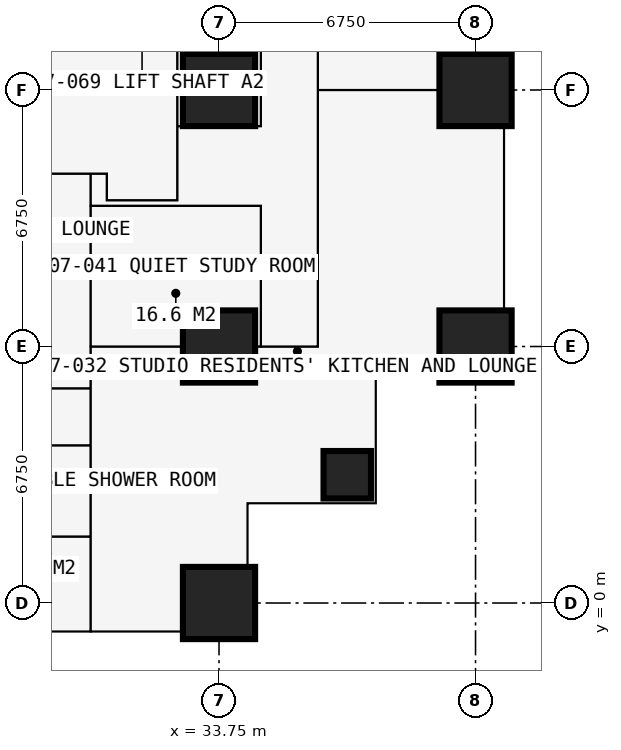
"""IFC4 building model, lengths in metres.
Left out: names, types, materials, properties, quantities, classifications, styles, units other than length and angle.
Written with IfcOpenShell. Run it as: python <this file> out.ifc"""

import sys

from ifc_helpers import new_model, si_unit, direction, frame, frame_2d, origin, origin_2d, place, context, subcontext, project, spatial, rectangle, extrude, element, fill, save


model = new_model("IFC4")
c1 = context("Model", 3, precision=1e-05, world=origin(), true_north=direction((0.0, 1.0)))
c2 = subcontext(c1, "Body", "Model", "MODEL_VIEW")
j1 = project(units=[si_unit("LENGTHUNIT", "METRE"), si_unit("PLANEANGLEUNIT", "RADIAN")], contexts=[c1])
p1 = place(None, origin())
s1 = spatial("IfcSite", under=j1, at=p1, CompositionType="ELEMENT")
p2 = place(p1, origin())
s2 = spatial("IfcBuilding", under=s1, at=p2, CompositionType="ELEMENT")
p3 = place(p2, frame((0.0, 0.0, 28.8)))
s3 = spatial("IfcBuildingStorey", under=s2, at=p3, CompositionType="ELEMENT", Elevation=28.8)
for number, where, z_axis, x_axis in (
    (1, (33.75, 0.0, 0.0), (0.0, 0.0, 1.0), (1.0, 0.0, 0.0)),
    (2, (33.75, 6.75, 0.0), (0.0, 0.0, 1.0), (1.0, 0.0, 0.0)),
    (3, (33.75, 13.5, 0.0), (0.0, 0.0, 1.0), (1.0, 0.0, 0.0)),
):
    element("IfcColumn", number, at=place(p3, frame(where, z_axis=z_axis, x_axis=x_axis)), inside=s3, PredefinedType="COLUMN", context=c2, shape_type="SweptSolid", body=[
        extrude(rectangle(XDim=1.9, YDim=1.9, at=origin_2d()), origin(), (0.0, 0.0, 1.0), 3.6),
    ])
p4 = place(p3, frame((37.125, 3.375, 0.0), z_axis=(0.0, 0.0, 1.0), x_axis=(1.0, 0.0, 0.0)))
e4 = element("IfcColumn", 4, at=p4, inside=s3, PredefinedType="COLUMN", context=c2, shape_type="SweptSolid", body=[
    extrude(rectangle(XDim=1.25, YDim=1.25, at=origin_2d()), origin(), (0.0, 0.0, 1.0), 3.6),
])
for number, where, z_axis, x_axis in (
    (5, (40.5, 6.75, 0.0), (0.0, 0.0, 1.0), (1.0, 0.0, 0.0)),
    (6, (40.5, 13.5, 0.0), (0.0, 0.0, 1.0), (1.0, 0.0, 0.0)),
):
    element("IfcColumn", number, at=place(p3, frame(where, z_axis=z_axis, x_axis=x_axis)), inside=s3, PredefinedType="COLUMN", context=c2, shape_type="SweptSolid", body=[
        extrude(rectangle(XDim=1.9, YDim=1.9, at=origin_2d()), origin(), (0.0, 0.0, 1.0), 3.6),
    ])
p5 = place(p3, frame((34.5, -0.75, 0.0), z_axis=(0.0, 0.0, 1.0), x_axis=(0.0, 1.0, 0.0)))
e7 = element("IfcWall", 7, at=p5, inside=s3, PredefinedType="SOLIDWALL", context=c2, shape_type="SweptSolid", body=[
    extrude(rectangle(XDim=3.375, YDim=0.3, at=frame_2d((1.688, 0.0))), origin(), (0.0, 0.0, 1.0), 3.375),
])
p6 = place(p5, frame((1.857, 0.0, 0.9)))
e8 = element("IfcOpeningElement", 8, at=p6, cuts=e7, PredefinedType="OPENING", context=c2, shape_type="SweptSolid", body=[
    extrude(rectangle(XDim=1.2, YDim=1.8, at=frame_2d((0.6, 0.9))), frame((0.0, 0.16, 0.0), z_axis=(0.0, -1.0, 0.0), x_axis=(1.0, 0.0, 0.0)), (0.0, 0.0, 1.0), 0.32),
])
p7 = place(p3, frame((34.5, 2.625, 0.0), z_axis=(0.0, 0.0, 1.0), x_axis=(1.0, 0.0, 0.0)))
e9 = element("IfcWall", 9, at=p7, inside=s3, PredefinedType="SOLIDWALL", context=c2, shape_type="SweptSolid", body=[
    extrude(rectangle(XDim=3.375, YDim=0.3, at=frame_2d((1.688, 0.0))), origin(), (0.0, 0.0, 1.0), 3.375),
])
p8 = place(p7, frame((0.788, 0.0, 0.6)))
e10 = element("IfcOpeningElement", 10, at=p8, cuts=e9, PredefinedType="OPENING", context=c2, shape_type="SweptSolid", body=[
    extrude(rectangle(XDim=1.8, YDim=2.1, at=frame_2d((0.9, 1.05))), frame((0.0, 0.16, 0.0), z_axis=(0.0, -1.0, 0.0), x_axis=(1.0, 0.0, 0.0)), (0.0, 0.0, 1.0), 0.32),
])
p9 = place(p3, frame((37.875, 2.625, 0.0), z_axis=(0.0, 0.0, 1.0), x_axis=(0.0, 1.0, 0.0)))
e11 = element("IfcWall", 11, at=p9, inside=s3, PredefinedType="SOLIDWALL", context=c2, shape_type="SweptSolid", body=[
    extrude(rectangle(XDim=3.375, YDim=0.3, at=frame_2d((1.688, 0.0))), origin(), (0.0, 0.0, 1.0), 3.375),
])
p10 = place(p9, frame((0.788, 0.0, 0.6)))
e12 = element("IfcOpeningElement", 12, at=p10, cuts=e11, PredefinedType="OPENING", context=c2, shape_type="SweptSolid", body=[
    extrude(rectangle(XDim=1.8, YDim=2.1, at=frame_2d((0.9, 1.05))), frame((0.0, 0.16, 0.0), z_axis=(0.0, -1.0, 0.0), x_axis=(1.0, 0.0, 0.0)), (0.0, 0.0, 1.0), 0.32),
])
p11 = place(p3, frame((37.875, 6.0, 0.0), z_axis=(0.0, 0.0, 1.0), x_axis=(1.0, 0.0, 0.0)))
e13 = element("IfcWall", 13, at=p11, inside=s3, PredefinedType="SOLIDWALL", context=c2, shape_type="SweptSolid", body=[
    extrude(rectangle(XDim=3.375, YDim=0.3, at=frame_2d((1.688, 0.0))), origin(), (0.0, 0.0, 1.0), 3.375),
])
p12 = place(p11, frame((0.317, 0.0, 0.9)))
e14 = element("IfcOpeningElement", 14, at=p12, cuts=e13, PredefinedType="OPENING", context=c2, shape_type="SweptSolid", body=[
    extrude(rectangle(XDim=1.2, YDim=1.8, at=frame_2d((0.6, 0.9))), frame((0.0, 0.16, 0.0), z_axis=(0.0, -1.0, 0.0), x_axis=(1.0, 0.0, 0.0)), (0.0, 0.0, 1.0), 0.32),
])
p13 = place(p3, frame((6.75, 4.15, 0.0), z_axis=(0.0, 0.0, 1.0), x_axis=(1.0, 0.0, 0.0)))
e15 = element("IfcWall", 15, at=p13, inside=s3, PredefinedType="PARTITIONING", context=c2, shape_type="SweptSolid", body=[
    extrude(rectangle(XDim=23.625, YDim=0.15, at=frame_2d((11.812, 0.0))), origin(), (0.0, 0.0, 1.0), 3.375),
])
p14 = place(p13, frame((0.2, 0.0, 0.0)))
e16 = element("IfcOpeningElement", 16, at=p14, cuts=e15, PredefinedType="OPENING", context=c2, shape_type="SweptSolid", body=[
    extrude(rectangle(XDim=0.95, YDim=2.2, at=frame_2d((0.475, 1.1))), frame((0.0, 0.085, 0.0), z_axis=(0.0, -1.0, 0.0), x_axis=(1.0, 0.0, 0.0)), (0.0, 0.0, 1.0), 0.17),
])
p15 = place(p13, frame((3.625, 0.0, 0.0)))
e17 = element("IfcOpeningElement", 17, at=p15, cuts=e15, PredefinedType="OPENING", context=c2, shape_type="SweptSolid", body=[
    extrude(rectangle(XDim=0.95, YDim=2.2, at=frame_2d((0.475, 1.1))), frame((0.0, 0.085, 0.0), z_axis=(0.0, -1.0, 0.0), x_axis=(1.0, 0.0, 0.0)), (0.0, 0.0, 1.0), 0.17),
])
p16 = place(p13, frame((18.475, 0.0, 0.0)))
e18 = element("IfcOpeningElement", 18, at=p16, cuts=e15, PredefinedType="OPENING", context=c2, shape_type="SweptSolid", body=[
    extrude(rectangle(XDim=0.95, YDim=2.2, at=frame_2d((0.475, 1.1))), frame((0.0, 0.085, 0.0), z_axis=(0.0, -1.0, 0.0), x_axis=(1.0, 0.0, 0.0)), (0.0, 0.0, 1.0), 0.17),
])
p17 = place(p13, frame((11.725, 0.0, 0.0)))
e19 = element("IfcOpeningElement", 19, at=p17, cuts=e15, PredefinedType="OPENING", context=c2, shape_type="SweptSolid", body=[
    extrude(rectangle(XDim=0.95, YDim=2.2, at=frame_2d((0.475, 1.1))), frame((0.0, 0.085, 0.0), z_axis=(0.0, -1.0, 0.0), x_axis=(1.0, 0.0, 0.0)), (0.0, 0.0, 1.0), 0.17),
])
p18 = place(p13, frame((6.95, 0.0, 0.0)))
e20 = element("IfcOpeningElement", 20, at=p18, cuts=e15, PredefinedType="OPENING", context=c2, shape_type="SweptSolid", body=[
    extrude(rectangle(XDim=0.95, YDim=2.2, at=frame_2d((0.475, 1.1))), frame((0.0, 0.085, 0.0), z_axis=(0.0, -1.0, 0.0), x_axis=(1.0, 0.0, 0.0)), (0.0, 0.0, 1.0), 0.17),
])
p19 = place(p3, frame((10.125, 11.3, 0.0), z_axis=(0.0, 0.0, 1.0), x_axis=(1.0, 0.0, 0.0)))
e21 = element("IfcWall", 21, at=p19, inside=s3, PredefinedType="PARTITIONING", context=c2, shape_type="SweptSolid", body=[
    extrude(rectangle(XDim=20.675, YDim=0.15, at=frame_2d((10.337, 0.0))), origin(), (0.0, 0.0, 1.0), 3.375),
])
p20 = place(p19, frame((1.775, 0.0, 0.0)))
e22 = element("IfcOpeningElement", 22, at=p20, cuts=e21, PredefinedType="OPENING", context=c2, shape_type="SweptSolid", body=[
    extrude(rectangle(XDim=1.0, YDim=2.2, at=frame_2d((0.5, 1.1))), frame((0.0, 0.085, 0.0), z_axis=(0.0, -1.0, 0.0), x_axis=(1.0, 0.0, 0.0)), (0.0, 0.0, 1.0), 0.17),
])
p21 = place(p19, frame((11.312, 0.0, 0.0)))
e23 = element("IfcOpeningElement", 23, at=p21, cuts=e21, PredefinedType="OPENING", context=c2, shape_type="SweptSolid", body=[
    extrude(rectangle(XDim=1.0, YDim=2.2, at=frame_2d((0.5, 1.1))), frame((0.0, 0.085, 0.0), z_axis=(0.0, -1.0, 0.0), x_axis=(1.0, 0.0, 0.0)), (0.0, 0.0, 1.0), 0.17),
])
p22 = place(p3, frame((22.988, 5.65, 0.0), z_axis=(0.0, 0.0, 1.0), x_axis=(1.0, 0.0, 0.0)))
e24 = element("IfcWall", 24, at=p22, inside=s3, PredefinedType="PARTITIONING", context=c2, shape_type="SweptSolid", body=[
    extrude(rectangle(XDim=7.387, YDim=0.15, at=frame_2d((3.694, 0.0))), origin(), (0.0, 0.0, 1.0), 3.375),
])
p23 = place(p22, frame((2.1, 0.0, 0.0)))
e25 = element("IfcOpeningElement", 25, at=p23, cuts=e24, PredefinedType="OPENING", context=c2, shape_type="SweptSolid", body=[
    extrude(rectangle(XDim=0.95, YDim=2.2, at=frame_2d((0.475, 1.1))), frame((0.0, 0.085, 0.0), z_axis=(0.0, -1.0, 0.0), x_axis=(1.0, 0.0, 0.0)), (0.0, 0.0, 1.0), 0.17),
])
p24 = place(p3, frame((27.775, 1.75, 0.0), z_axis=(0.0, 0.0, 1.0), x_axis=(1.0, 0.0, 0.0)))
e26 = element("IfcWall", 26, at=p24, inside=s3, PredefinedType="PARTITIONING", context=c2, shape_type="SweptSolid", body=[
    extrude(rectangle(XDim=2.6, YDim=0.1, at=frame_2d((1.3, 0.0))), origin(), (0.0, 0.0, 1.0), 3.375),
])
p25 = place(p24, frame((0.85, 0.0, 0.0)))
e27 = element("IfcOpeningElement", 27, at=p25, cuts=e26, PredefinedType="OPENING", context=c2, shape_type="SweptSolid", body=[
    extrude(rectangle(XDim=0.9, YDim=2.2, at=frame_2d((0.45, 1.1))), frame((0.0, 0.06, 0.0), z_axis=(0.0, -1.0, 0.0), x_axis=(1.0, 0.0, 0.0)), (0.0, 0.0, 1.0), 0.12),
])
p26 = place(p3, frame((30.375, -0.734, 0.0), z_axis=(0.0, 0.0, 1.0), x_axis=(0.0, 1.0, 0.0)))
e28 = element("IfcWall", 28, at=p26, inside=s3, PredefinedType="PARTITIONING", context=c2, shape_type="SweptSolid", body=[
    extrude(rectangle(XDim=12.034, YDim=0.15, at=frame_2d((6.017, 0.0))), origin(), (0.0, 0.0, 1.0), 3.375),
])
p27 = place(p26, frame((5.134, 0.0, 0.0)))
e29 = element("IfcOpeningElement", 29, at=p27, cuts=e28, PredefinedType="OPENING", context=c2, shape_type="SweptSolid", body=[
    extrude(rectangle(XDim=1.0, YDim=2.2, at=frame_2d((0.5, 1.1))), frame((0.0, 0.085, 0.0), z_axis=(0.0, -1.0, 0.0), x_axis=(1.0, 0.0, 0.0)), (0.0, 0.0, 1.0), 0.17),
])
p28 = place(p3, frame((30.375, 6.75, 0.0), z_axis=(0.0, 0.0, 1.0), x_axis=(1.0, 0.0, 0.0)))
e30 = element("IfcWall", 30, at=p28, inside=s3, PredefinedType="PARTITIONING", context=c2, shape_type="SweptSolid", body=[
    extrude(rectangle(XDim=5.975, YDim=0.15, at=frame_2d((2.988, 0.0))), origin(), (0.0, 0.0, 1.0), 2.877),
])
p29 = place(p3, frame((30.375, 10.45, 0.0), z_axis=(0.0, 0.0, 1.0), x_axis=(1.0, 0.0, 0.0)))
e31 = element("IfcWall", 31, at=p29, inside=s3, PredefinedType="PARTITIONING", context=c2, shape_type="SweptSolid", body=[
    extrude(rectangle(XDim=4.475, YDim=0.15, at=frame_2d((2.238, 0.0))), origin(), (0.0, 0.0, 1.0), 3.375),
])
p30 = place(p29, frame((2.35, 0.0, 0.0)))
e32 = element("IfcOpeningElement", 32, at=p30, cuts=e31, PredefinedType="OPENING", context=c2, shape_type="SweptSolid", body=[
    extrude(rectangle(XDim=0.95, YDim=2.2, at=frame_2d((0.475, 1.1))), frame((0.0, 0.085, 0.0), z_axis=(0.0, -1.0, 0.0), x_axis=(1.0, 0.0, 0.0)), (0.0, 0.0, 1.0), 0.17),
])
p31 = place(p3, frame((30.8, 10.6, 0.0), z_axis=(0.0, 0.0, 1.0), x_axis=(0.0, 1.0, 0.0)))
e33 = element("IfcWall", 33, at=p31, inside=s3, PredefinedType="PARTITIONING", context=c2, shape_type="SweptSolid", body=[
    extrude(rectangle(XDim=0.7, YDim=0.15, at=frame_2d((0.35, 0.0))), origin(), (0.0, 0.0, 1.0), 3.375),
])
p32 = place(p3, frame((30.8, 10.6, 0.0), z_axis=(0.0, 0.0, 1.0), x_axis=(1.0, 0.0, 0.0)))
e34 = element("IfcWall", 34, at=p32, inside=s3, PredefinedType="PARTITIONING", context=c2, shape_type="SweptSolid", body=[
    extrude(rectangle(XDim=1.85, YDim=0.15, at=frame_2d((0.925, 0.0))), origin(), (0.0, 0.0, 1.0), 3.375),
])
p33 = place(p3, frame((32.65, 10.6, 0.0), z_axis=(0.0, 0.0, 1.0), x_axis=(0.0, 1.0, 0.0)))
e35 = element("IfcWall", 35, at=p33, inside=s3, PredefinedType="SHEAR", context=c2, shape_type="SweptSolid", body=[
    extrude(rectangle(XDim=9.3, YDim=0.1, at=frame_2d((4.65, 0.0))), origin(), (0.0, 0.0, 1.0), 3.375),
])
p34 = place(p33, frame((0.5, 0.0, 0.0)))
e36 = element("IfcOpeningElement", 36, at=p34, cuts=e35, PredefinedType="OPENING", context=c2, shape_type="SweptSolid", body=[
    extrude(rectangle(XDim=1.0, YDim=2.2, at=frame_2d((0.5, 1.1))), frame((0.0, 0.06, 0.0), z_axis=(0.0, -1.0, 0.0), x_axis=(1.0, 0.0, 0.0)), (0.0, 0.0, 1.0), 0.12),
])
p35 = place(p3, frame((32.65, 12.55, 0.0), z_axis=(0.0, 0.0, 1.0), x_axis=(1.0, 0.0, 0.0)))
e37 = element("IfcWall", 37, at=p35, inside=s3, PredefinedType="PARTITIONING", context=c2, shape_type="SweptSolid", body=[
    extrude(rectangle(XDim=2.2, YDim=0.15, at=frame_2d((1.1, 0.0))), origin(), (0.0, 0.0, 1.0), 3.375),
])
p36 = place(p3, frame((34.85, 6.75, 0.0), z_axis=(0.0, 0.0, 1.0), x_axis=(0.0, 1.0, 0.0)))
e38 = element("IfcWall", 38, at=p36, inside=s3, PredefinedType="PARTITIONING", context=c2, shape_type="SweptSolid", body=[
    extrude(rectangle(XDim=3.7, YDim=0.15, at=frame_2d((1.85, 0.0))), origin(), (0.0, 0.0, 1.0), 3.375),
])
p37 = place(p3, frame((34.85, 12.55, 0.0), z_axis=(0.0, 0.0, 1.0), x_axis=(0.0, 1.0, 0.0)))
e39 = element("IfcWall", 39, at=p37, inside=s3, PredefinedType="PARTITIONING", context=c2, shape_type="SweptSolid", body=[
    extrude(rectangle(XDim=17.825, YDim=0.15, at=frame_2d((8.913, 0.0))), origin(), (0.0, 0.0, 1.0), 3.375),
])
p38 = place(p37, frame((8.65, 0.0, 0.0)))
e40 = element("IfcOpeningElement", 40, at=p38, cuts=e39, PredefinedType="OPENING", context=c2, shape_type="SweptSolid", body=[
    extrude(rectangle(XDim=0.95, YDim=2.2, at=frame_2d((0.475, 1.1))), frame((0.0, 0.085, 0.0), z_axis=(0.0, -1.0, 0.0), x_axis=(1.0, 0.0, 0.0)), (0.0, 0.0, 1.0), 0.17),
])
p39 = place(p3, frame((36.35, 6.75, 0.0), z_axis=(0.0, 0.0, 1.0), x_axis=(0.0, 1.0, 0.0)))
e41 = element("IfcWall", 41, at=p39, inside=s3, PredefinedType="PARTITIONING", context=c2, shape_type="SweptSolid", body=[
    extrude(rectangle(XDim=23.625, YDim=0.15, at=frame_2d((11.812, 0.0))), origin(), (0.0, 0.0, 1.0), 3.375),
])
p40 = place(p39, frame((18.475, 0.0, 0.0)))
e42 = element("IfcOpeningElement", 42, at=p40, cuts=e41, PredefinedType="OPENING", context=c2, shape_type="SweptSolid", body=[
    extrude(rectangle(XDim=0.95, YDim=2.2, at=frame_2d((0.475, 1.1))), frame((0.0, 0.085, 0.0), z_axis=(0.0, -1.0, 0.0), x_axis=(1.0, 0.0, 0.0)), (0.0, 0.0, 1.0), 0.17),
])
p41 = place(p39, frame((11.725, 0.0, 0.0)))
e43 = element("IfcOpeningElement", 43, at=p41, cuts=e41, PredefinedType="OPENING", context=c2, shape_type="SweptSolid", body=[
    extrude(rectangle(XDim=0.95, YDim=2.2, at=frame_2d((0.475, 1.1))), frame((0.0, 0.085, 0.0), z_axis=(0.0, -1.0, 0.0), x_axis=(1.0, 0.0, 0.0)), (0.0, 0.0, 1.0), 0.17),
])
p42 = place(p39, frame((6.95, 0.0, 0.0)))
e44 = element("IfcOpeningElement", 44, at=p42, cuts=e41, PredefinedType="OPENING", context=c2, shape_type="SweptSolid", body=[
    extrude(rectangle(XDim=0.95, YDim=2.2, at=frame_2d((0.475, 1.1))), frame((0.0, 0.085, 0.0), z_axis=(0.0, -1.0, 0.0), x_axis=(1.0, 0.0, 0.0)), (0.0, 0.0, 1.0), 0.17),
])
p43 = place(p3, frame((36.35, 13.5, 0.0), z_axis=(0.0, 0.0, 1.0), x_axis=(1.0, 0.0, 0.0)))
e45 = element("IfcWall", 45, at=p43, inside=s3, PredefinedType="PARTITIONING", context=c2, shape_type="SweptSolid", body=[
    extrude(rectangle(XDim=4.884, YDim=0.15, at=frame_2d((2.442, 0.0))), origin(), (0.0, 0.0, 1.0), 2.61),
])
p44 = place(p6, origin())
e46 = element("IfcWindow", 46, at=p44, inside=s3, PartitioningType="SINGLE_PANEL", PredefinedType="WINDOW", context=c2, shape_type="SweptSolid", body=[
    extrude(rectangle(XDim=1.2, YDim=1.8, at=frame_2d((0.6, 0.9))), frame((0.0, 0.03, 0.0), z_axis=(0.0, -1.0, 0.0), x_axis=(1.0, 0.0, 0.0)), (0.0, 0.0, 1.0), 0.06),
])
fill(e8, e46)
p45 = place(p8, origin())
e47 = element("IfcWindow", 47, at=p45, inside=s3, PartitioningType="SINGLE_PANEL", PredefinedType="WINDOW", context=c2, shape_type="SweptSolid", body=[
    extrude(rectangle(XDim=1.8, YDim=2.1, at=frame_2d((0.9, 1.05))), frame((0.0, 0.03, 0.0), z_axis=(0.0, -1.0, 0.0), x_axis=(1.0, 0.0, 0.0)), (0.0, 0.0, 1.0), 0.06),
])
fill(e10, e47)
p46 = place(p10, origin())
e48 = element("IfcWindow", 48, at=p46, inside=s3, PartitioningType="SINGLE_PANEL", PredefinedType="WINDOW", context=c2, shape_type="SweptSolid", body=[
    extrude(rectangle(XDim=1.8, YDim=2.1, at=frame_2d((0.9, 1.05))), frame((0.0, 0.03, 0.0), z_axis=(0.0, -1.0, 0.0), x_axis=(1.0, 0.0, 0.0)), (0.0, 0.0, 1.0), 0.06),
])
fill(e12, e48)
p47 = place(p12, origin())
e49 = element("IfcWindow", 49, at=p47, inside=s3, PartitioningType="SINGLE_PANEL", PredefinedType="WINDOW", context=c2, shape_type="SweptSolid", body=[
    extrude(rectangle(XDim=1.2, YDim=1.8, at=frame_2d((0.6, 0.9))), frame((0.0, 0.03, 0.0), z_axis=(0.0, -1.0, 0.0), x_axis=(1.0, 0.0, 0.0)), (0.0, 0.0, 1.0), 0.06),
])
fill(e14, e49)
p48 = place(p25, origin())
e50 = element("IfcDoor", 50, at=p48, inside=s3, OperationType="SINGLE_SWING_RIGHT", PredefinedType="DOOR", context=c2, shape_type="SweptSolid", body=[
    extrude(rectangle(XDim=0.9, YDim=2.2, at=frame_2d((0.45, 1.1))), frame((0.0, 0.025, 0.0), z_axis=(0.0, -1.0, 0.0), x_axis=(1.0, 0.0, 0.0)), (0.0, 0.0, 1.0), 0.05),
])
fill(e27, e50)
p49 = place(p27, origin())
e51 = element("IfcDoor", 51, at=p49, inside=s3, OperationType="SINGLE_SWING_LEFT", PredefinedType="DOOR", context=c2, shape_type="SweptSolid", body=[
    extrude(rectangle(XDim=1.0, YDim=2.2, at=frame_2d((0.5, 1.1))), frame((0.0, 0.025, 0.0), z_axis=(0.0, -1.0, 0.0), x_axis=(1.0, 0.0, 0.0)), (0.0, 0.0, 1.0), 0.05),
])
fill(e29, e51)
p50 = place(p42, origin())
e52 = element("IfcDoor", 52, at=p50, inside=s3, OperationType="SINGLE_SWING_LEFT", PredefinedType="DOOR", context=c2, shape_type="SweptSolid", body=[
    extrude(rectangle(XDim=0.95, YDim=2.2, at=frame_2d((0.475, 1.1))), frame((0.0, 0.025, 0.0), z_axis=(0.0, -1.0, 0.0), x_axis=(1.0, 0.0, 0.0)), (0.0, 0.0, 1.0), 0.05),
])
fill(e44, e52)
p51 = place(p34, origin())
e53 = element("IfcDoor", 53, at=p51, inside=s3, OperationType="SINGLE_SWING_LEFT", PredefinedType="DOOR", context=c2, shape_type="SweptSolid", body=[
    extrude(rectangle(XDim=1.0, YDim=2.2, at=frame_2d((0.5, 1.1))), frame((0.0, 0.025, 0.0), z_axis=(0.0, -1.0, 0.0), x_axis=(1.0, 0.0, 0.0)), (0.0, 0.0, 1.0), 0.05),
])
fill(e36, e53)
p52 = place(p30, origin())
e54 = element("IfcDoor", 54, at=p52, inside=s3, OperationType="SINGLE_SWING_LEFT", PredefinedType="DOOR", context=c2, shape_type="SweptSolid", body=[
    extrude(rectangle(XDim=0.95, YDim=2.2, at=frame_2d((0.475, 1.1))), frame((0.0, 0.025, 0.0), z_axis=(0.0, -1.0, 0.0), x_axis=(1.0, 0.0, 0.0)), (0.0, 0.0, 1.0), 0.05),
])
fill(e32, e54)
save(model, sys.argv[1])
